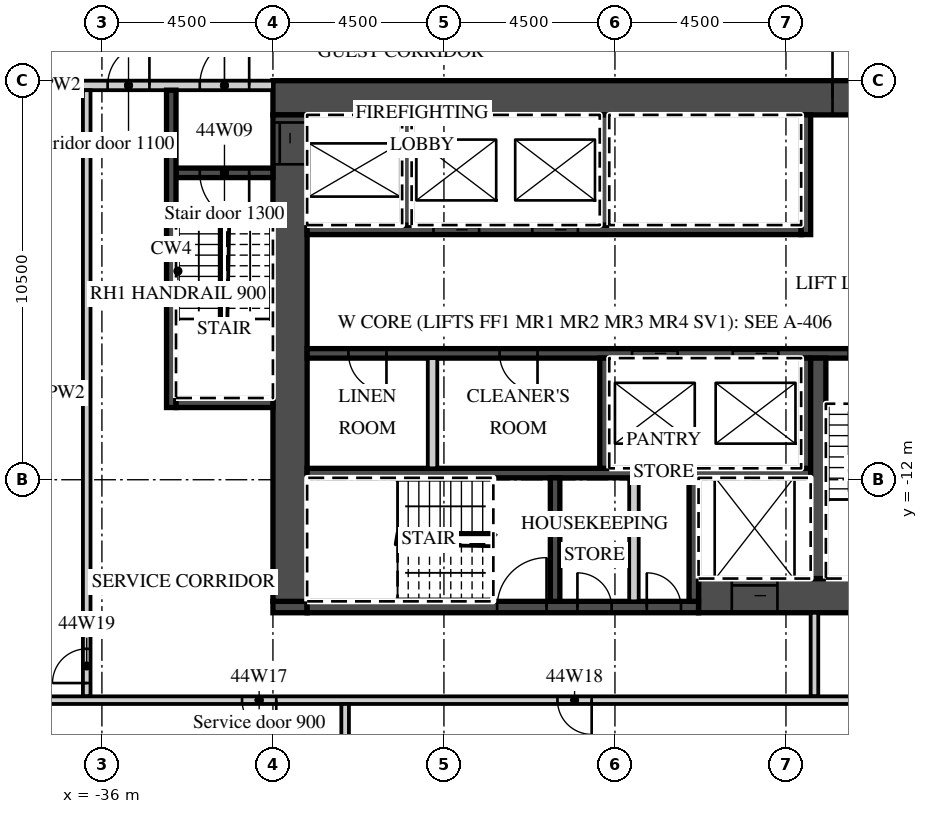
"""IFC4 building model, lengths in metres.
Left out: names, types, materials, properties, quantities, classifications, styles, units other than length and angle.
Written with IfcOpenShell. Run it as: python <this file> out.ifc"""

import sys

from ifc_helpers import new_model, si_unit, direction, frame, frame_2d, origin, place, context, subcontext, project, spatial, rectangle, extrude, element, fill, save


model = new_model("IFC4")
c1 = context("Model", 3, precision=1e-05, world=origin(), true_north=direction((0.0, 1.0)))
c2 = subcontext(c1, "Body", "Model", "MODEL_VIEW")
j1 = project(units=[si_unit("LENGTHUNIT", "METRE"), si_unit("PLANEANGLEUNIT", "RADIAN")], contexts=[c1])
p1 = place(None, origin())
s1 = spatial("IfcSite", under=j1, at=p1, CompositionType="ELEMENT")
p2 = place(p1, origin())
s2 = spatial("IfcBuilding", under=s1, at=p2, CompositionType="ELEMENT")
p3 = place(p2, frame((0.0, 0.0, 186.7)))
s3 = spatial("IfcBuildingStorey", under=s2, at=p3, CompositionType="ELEMENT", Elevation=186.7)
p4 = place(p3, frame((-31.5, -1.95, 0.0), z_axis=(0.0, 0.0, 1.0), x_axis=(1.0, 0.0, 0.0)))
e1 = element("IfcWall", 1, at=p4, inside=s3, PredefinedType="SHEAR", context=c2, shape_type="SweptSolid", body=[
    extrude(rectangle(XDim=18.0, YDim=0.9, at=frame_2d((9.0, 0.0))), origin(), (0.0, 0.0, 1.0), 3.02),
])
p5 = place(p4, frame((14.725, 0.0, 0.0)))
e2 = element("IfcOpeningElement", 2, at=p5, cuts=e1, PredefinedType="OPENING", context=c2, shape_type="SweptSolid", body=[
    extrude(rectangle(XDim=1.8, YDim=2.1, at=frame_2d((0.9, 1.05))), frame((0.0, 0.46, 0.0), z_axis=(0.0, -1.0, 0.0), x_axis=(1.0, 0.0, 0.0)), (0.0, 0.0, 1.0), 0.92),
])
p6 = place(p3, frame((-20.3, -15.05, 0.0), z_axis=(0.0, 0.0, 1.0), x_axis=(1.0, 0.0, 0.0)))
e3 = element("IfcWall", 3, at=p6, inside=s3, PredefinedType="SHEAR", context=c2, shape_type="SweptSolid", body=[
    extrude(rectangle(XDim=6.8, YDim=0.9, at=frame_2d((3.4, 0.0))), origin(), (0.0, 0.0, 1.0), 3.02),
])
p7 = place(p6, frame((0.875, 0.0, 0.0)))
e4 = element("IfcOpeningElement", 4, at=p7, cuts=e3, PredefinedType="OPENING", context=c2, shape_type="SweptSolid", body=[
    extrude(rectangle(XDim=1.2, YDim=2.1, at=frame_2d((0.6, 1.05))), frame((0.0, 0.46, 0.0), z_axis=(0.0, -1.0, 0.0), x_axis=(1.0, 0.0, 0.0)), (0.0, 0.0, 1.0), 0.92),
])
p8 = place(p3, frame((-31.5, -15.35, 0.0), z_axis=(0.0, 0.0, 1.0), x_axis=(1.0, 0.0, 0.0)))
e5 = element("IfcWall", 5, at=p8, inside=s3, PredefinedType="SHEAR", context=c2, shape_type="SweptSolid", body=[
    extrude(rectangle(XDim=0.9, YDim=0.3, at=frame_2d((0.45, 0.0))), origin(), (0.0, 0.0, 1.0), 3.02),
])
p9 = place(p3, frame((-30.6, -15.35, 0.0), z_axis=(0.0, 0.0, 1.0), x_axis=(1.0, 0.0, 0.0)))
e6 = element("IfcWall", 6, at=p9, inside=s3, PredefinedType="SHEAR", context=c2, shape_type="SweptSolid", body=[
    extrude(rectangle(XDim=10.3, YDim=0.3, at=frame_2d((5.15, 0.0))), origin(), (0.0, 0.0, 1.0), 3.02),
])
p10 = place(p9, frame((5.0, 0.0, 0.0)))
e7 = element("IfcOpeningElement", 7, at=p10, cuts=e6, PredefinedType="OPENING", context=c2, shape_type="SweptSolid", body=[
    extrude(rectangle(XDim=1.3, YDim=2.1, at=frame_2d((0.65, 1.05))), frame((0.0, 0.16, 0.0), z_axis=(0.0, -1.0, 0.0), x_axis=(1.0, 0.0, 0.0)), (0.0, 0.0, 1.0), 0.32),
])
p11 = place(p9, frame((7.113, 0.0, 0.0)))
e8 = element("IfcOpeningElement", 8, at=p11, cuts=e6, PredefinedType="OPENING", context=c2, shape_type="SweptSolid", body=[
    extrude(rectangle(XDim=0.9, YDim=2.1, at=frame_2d((0.45, 1.05))), frame((0.0, 0.16, 0.0), z_axis=(0.0, -1.0, 0.0), x_axis=(1.0, 0.0, 0.0)), (0.0, 0.0, 1.0), 0.32),
])
p12 = place(p9, frame((8.938, 0.0, 0.0)))
e9 = element("IfcOpeningElement", 9, at=p12, cuts=e6, PredefinedType="OPENING", context=c2, shape_type="SweptSolid", body=[
    extrude(rectangle(XDim=0.9, YDim=2.1, at=frame_2d((0.45, 1.05))), frame((0.0, 0.16, 0.0), z_axis=(0.0, -1.0, 0.0), x_axis=(1.0, 0.0, 0.0)), (0.0, 0.0, 1.0), 0.32),
])
p13 = place(p3, frame((-31.05, -15.2, 0.0), z_axis=(0.0, 0.0, 1.0), x_axis=(0.0, 1.0, 0.0)))
e10 = element("IfcWall", 10, at=p13, inside=s3, PredefinedType="SHEAR", context=c2, shape_type="SweptSolid", body=[
    extrude(rectangle(XDim=12.8, YDim=0.9, at=frame_2d((6.4, 0.0))), origin(), (0.0, 0.0, 1.0), 3.02),
])
p14 = place(p13, frame((11.5, 0.0, 0.0)))
e11 = element("IfcOpeningElement", 11, at=p14, cuts=e10, PredefinedType="OPENING", context=c2, shape_type="SweptSolid", body=[
    extrude(rectangle(XDim=1.1, YDim=2.1, at=frame_2d((0.55, 1.05))), frame((0.0, 0.46, 0.0), z_axis=(0.0, -1.0, 0.0), x_axis=(1.0, 0.0, 0.0)), (0.0, 0.0, 1.0), 0.92),
])
p15 = place(p3, frame((-30.6, -5.425, 0.0), z_axis=(0.0, 0.0, 1.0), x_axis=(1.0, 0.0, 0.0)))
e12 = element("IfcWall", 12, at=p15, inside=s3, PredefinedType="SHEAR", context=c2, shape_type="SweptSolid", body=[
    extrude(rectangle(XDim=13.0, YDim=0.25, at=frame_2d((6.5, 0.0))), origin(), (0.0, 0.0, 1.0), 3.02),
])
p16 = place(p15, frame((3.325, 0.0, 0.0)))
e13 = element("IfcOpeningElement", 13, at=p16, cuts=e12, PredefinedType="OPENING", context=c2, shape_type="SweptSolid", body=[
    extrude(rectangle(XDim=1.2, YDim=2.1, at=frame_2d((0.6, 1.05))), frame((0.0, 0.135, 0.0), z_axis=(0.0, -1.0, 0.0), x_axis=(1.0, 0.0, 0.0)), (0.0, 0.0, 1.0), 0.27),
])
p17 = place(p15, frame((5.925, 0.0, 0.0)))
e14 = element("IfcOpeningElement", 14, at=p17, cuts=e12, PredefinedType="OPENING", context=c2, shape_type="SweptSolid", body=[
    extrude(rectangle(XDim=1.2, YDim=2.1, at=frame_2d((0.6, 1.05))), frame((0.0, 0.135, 0.0), z_axis=(0.0, -1.0, 0.0), x_axis=(1.0, 0.0, 0.0)), (0.0, 0.0, 1.0), 0.27),
])
p18 = place(p3, frame((-17.475, -5.55, 0.0), z_axis=(0.0, 0.0, 1.0), x_axis=(0.0, 1.0, 0.0)))
e15 = element("IfcWall", 15, at=p18, inside=s3, PredefinedType="SHEAR", context=c2, shape_type="SweptSolid", body=[
    extrude(rectangle(XDim=3.15, YDim=0.25, at=frame_2d((1.575, 0.0))), origin(), (0.0, 0.0, 1.0), 3.02),
])
for number, where, z_axis, x_axis in (
    (16, (-27.975, -5.3, 0.0), (0.0, 0.0, 1.0), (0.0, 1.0, 0.0)),
    (17, (-22.775, -5.3, 0.0), (0.0, 0.0, 1.0), (0.0, 1.0, 0.0)),
):
    element("IfcWall", number, at=place(p3, frame(where, z_axis=z_axis, x_axis=x_axis)), inside=s3, PredefinedType="SHEAR", context=c2, shape_type="SweptSolid", body=[
        extrude(rectangle(XDim=2.9, YDim=0.25, at=frame_2d((1.45, 0.0))), origin(), (0.0, 0.0, 1.0), 3.02),
    ])
p19 = place(p3, frame((-30.6, -8.675, 0.0), z_axis=(0.0, 0.0, 1.0), x_axis=(1.0, 0.0, 0.0)))
e18 = element("IfcWall", 18, at=p19, inside=s3, PredefinedType="SHEAR", context=c2, shape_type="SweptSolid", body=[
    extrude(rectangle(XDim=16.2, YDim=0.25, at=frame_2d((8.1, 0.0))), origin(), (0.0, 0.0, 1.0), 3.02),
])
p20 = place(p19, frame((8.55, 0.0, 0.0)))
e19 = element("IfcOpeningElement", 19, at=p20, cuts=e18, PredefinedType="OPENING", context=c2, shape_type="SweptSolid", body=[
    extrude(rectangle(XDim=1.2, YDim=2.1, at=frame_2d((0.6, 1.05))), frame((0.0, 0.135, 0.0), z_axis=(0.0, -1.0, 0.0), x_axis=(1.0, 0.0, 0.0)), (0.0, 0.0, 1.0), 0.27),
])
p21 = place(p19, frame((11.2, 0.0, 0.0)))
e20 = element("IfcOpeningElement", 20, at=p21, cuts=e18, PredefinedType="OPENING", context=c2, shape_type="SweptSolid", body=[
    extrude(rectangle(XDim=1.2, YDim=2.1, at=frame_2d((0.6, 1.05))), frame((0.0, 0.135, 0.0), z_axis=(0.0, -1.0, 0.0), x_axis=(1.0, 0.0, 0.0)), (0.0, 0.0, 1.0), 0.27),
])
p22 = place(p19, frame((14.25, 0.0, 0.0)))
e21 = element("IfcOpeningElement", 21, at=p22, cuts=e18, PredefinedType="OPENING", context=c2, shape_type="SweptSolid", body=[
    extrude(rectangle(XDim=1.3, YDim=2.1, at=frame_2d((0.65, 1.05))), frame((0.0, 0.135, 0.0), z_axis=(0.0, -1.0, 0.0), x_axis=(1.0, 0.0, 0.0)), (0.0, 0.0, 1.0), 0.27),
])
p23 = place(p19, frame((1.087, 0.0, 0.0)))
e22 = element("IfcOpeningElement", 22, at=p23, cuts=e18, PredefinedType="OPENING", context=c2, shape_type="SweptSolid", body=[
    extrude(rectangle(XDim=1.0, YDim=2.1, at=frame_2d((0.5, 1.05))), frame((0.0, 0.135, 0.0), z_axis=(0.0, -1.0, 0.0), x_axis=(1.0, 0.0, 0.0)), (0.0, 0.0, 1.0), 0.27),
])
p24 = place(p19, frame((5.062, 0.0, 0.0)))
e23 = element("IfcOpeningElement", 23, at=p24, cuts=e18, PredefinedType="OPENING", context=c2, shape_type="SweptSolid", body=[
    extrude(rectangle(XDim=1.0, YDim=2.1, at=frame_2d((0.5, 1.05))), frame((0.0, 0.135, 0.0), z_axis=(0.0, -1.0, 0.0), x_axis=(1.0, 0.0, 0.0)), (0.0, 0.0, 1.0), 0.27),
])
p25 = place(p3, frame((-30.6, -11.825, 0.0), z_axis=(0.0, 0.0, 1.0), x_axis=(1.0, 0.0, 0.0)))
e24 = element("IfcWall", 24, at=p25, inside=s3, PredefinedType="SHEAR", context=c2, shape_type="SweptSolid", body=[
    extrude(rectangle(XDim=13.25, YDim=0.25, at=frame_2d((6.625, 0.0))), origin(), (0.0, 0.0, 1.0), 3.02),
])
for number, where, z_axis, x_axis in (
    (25, (-17.475, -11.7, 0.0), (0.0, 0.0, 1.0), (0.0, 1.0, 0.0)),
    (26, (-22.775, -11.7, 0.0), (0.0, 0.0, 1.0), (0.0, 1.0, 0.0)),
):
    element("IfcWall", number, at=place(p3, frame(where, z_axis=z_axis, x_axis=x_axis)), inside=s3, PredefinedType="SHEAR", context=c2, shape_type="SweptSolid", body=[
        extrude(rectangle(XDim=2.9, YDim=0.25, at=frame_2d((1.45, 0.0))), origin(), (0.0, 0.0, 1.0), 3.02),
    ])
p26 = place(p3, frame((-27.3, -11.7, 0.0), z_axis=(0.0, 0.0, 1.0), x_axis=(0.0, 1.0, 0.0)))
e27 = element("IfcWall", 27, at=p26, inside=s3, PredefinedType="PARTITIONING", context=c2, shape_type="SweptSolid", body=[
    extrude(rectangle(XDim=2.9, YDim=0.25, at=frame_2d((1.45, 0.0))), origin(), (0.0, 0.0, 1.0), 3.02),
])
p27 = place(p3, frame((-17.15, -14.6, 0.0), z_axis=(0.0, 0.0, 1.0), x_axis=(0.0, 1.0, 0.0)))
e28 = element("IfcWall", 28, at=p27, inside=s3, PredefinedType="SHEAR", context=c2, shape_type="SweptSolid", body=[
    extrude(rectangle(XDim=5.8, YDim=0.4, at=frame_2d((2.9, 0.0))), origin(), (0.0, 0.0, 1.0), 3.02),
])
for number, where, z_axis, x_axis in (
    (29, (-20.425, -15.2, 0.0), (0.0, 0.0, 1.0), (0.0, 1.0, 0.0)),
    (30, (-24.075, -15.2, 0.0), (0.0, 0.0, 1.0), (0.0, 1.0, 0.0)),
):
    element("IfcWall", number, at=place(p3, frame(where, z_axis=z_axis, x_axis=x_axis)), inside=s3, PredefinedType="SHEAR", context=c2, shape_type="SweptSolid", body=[
        extrude(rectangle(XDim=3.25, YDim=0.25, at=frame_2d((1.625, 0.0))), origin(), (0.0, 0.0, 1.0), 3.02),
    ])
p28 = place(p3, frame((-22.0, -15.2, 0.0), z_axis=(0.0, 0.0, 1.0), x_axis=(0.0, 1.0, 0.0)))
e31 = element("IfcWall", 31, at=p28, inside=s3, PredefinedType="PARTITIONING", context=c2, shape_type="SweptSolid", body=[
    extrude(rectangle(XDim=3.25, YDim=0.25, at=frame_2d((1.625, 0.0))), origin(), (0.0, 0.0, 1.0), 3.02),
])
p29 = place(p3, frame((-42.632, -1.625, 0.0), z_axis=(0.0, 0.0, 1.0), x_axis=(1.0, 0.0, 0.0)))
e32 = element("IfcWall", 32, at=p29, inside=s3, PredefinedType="PARTITIONING", context=c2, shape_type="SweptSolid", body=[
    extrude(rectangle(XDim=11.132, YDim=0.25, at=frame_2d((5.566, 0.0))), origin(), (0.0, 0.0, 1.0), 3.02),
])
p30 = place(p29, frame((9.207, 0.0, 0.0)))
e33 = element("IfcOpeningElement", 33, at=p30, cuts=e32, PredefinedType="OPENING", context=c2, shape_type="SweptSolid", body=[
    extrude(rectangle(XDim=1.3, YDim=2.1, at=frame_2d((0.65, 1.05))), frame((0.0, 0.135, 0.0), z_axis=(0.0, -1.0, 0.0), x_axis=(1.0, 0.0, 0.0)), (0.0, 0.0, 1.0), 0.27),
])
p31 = place(p29, frame((6.781, 0.0, 0.0)))
e34 = element("IfcOpeningElement", 34, at=p31, cuts=e32, PredefinedType="OPENING", context=c2, shape_type="SweptSolid", body=[
    extrude(rectangle(XDim=1.1, YDim=2.1, at=frame_2d((0.55, 1.05))), frame((0.0, 0.135, 0.0), z_axis=(0.0, -1.0, 0.0), x_axis=(1.0, 0.0, 0.0)), (0.0, 0.0, 1.0), 0.27),
])
p32 = place(p3, frame((-34.05, -3.925, 0.0), z_axis=(0.0, 0.0, 1.0), x_axis=(1.0, 0.0, 0.0)))
e35 = element("IfcWall", 35, at=p32, inside=s3, PredefinedType="SHEAR", context=c2, shape_type="SweptSolid", body=[
    extrude(rectangle(XDim=2.55, YDim=0.25, at=frame_2d((1.275, 0.0))), origin(), (0.0, 0.0, 1.0), 3.02),
])
p33 = place(p32, frame((0.625, 0.0, 0.0)))
e36 = element("IfcOpeningElement", 36, at=p33, cuts=e35, PredefinedType="OPENING", context=c2, shape_type="SweptSolid", body=[
    extrude(rectangle(XDim=1.3, YDim=2.1, at=frame_2d((0.65, 1.05))), frame((0.0, 0.135, 0.0), z_axis=(0.0, -1.0, 0.0), x_axis=(1.0, 0.0, 0.0)), (0.0, 0.0, 1.0), 0.27),
])
p34 = place(p3, frame((-34.175, -10.1, 0.0), z_axis=(0.0, 0.0, 1.0), x_axis=(0.0, 1.0, 0.0)))
e37 = element("IfcWall", 37, at=p34, inside=s3, PredefinedType="SHEAR", context=c2, shape_type="SweptSolid", body=[
    extrude(rectangle(XDim=8.35, YDim=0.25, at=frame_2d((4.175, 0.0))), origin(), (0.0, 0.0, 1.0), 3.02),
])
p35 = place(p3, frame((-34.05, -9.975, 0.0), z_axis=(0.0, 0.0, 1.0), x_axis=(1.0, 0.0, 0.0)))
e38 = element("IfcWall", 38, at=p35, inside=s3, PredefinedType="SHEAR", context=c2, shape_type="SweptSolid", body=[
    extrude(rectangle(XDim=2.55, YDim=0.25, at=frame_2d((1.275, 0.0))), origin(), (0.0, 0.0, 1.0), 3.02),
])
p36 = place(p3, frame((-17.25, -17.7, 0.0), z_axis=(0.0, 0.0, 1.0), x_axis=(0.0, 1.0, 0.0)))
e39 = element("IfcWall", 39, at=p36, inside=s3, PredefinedType="PARTITIONING", context=c2, shape_type="SweptSolid", body=[
    extrude(rectangle(XDim=2.2, YDim=0.2, at=frame_2d((1.1, 0.0))), origin(), (0.0, 0.0, 1.0), 3.02),
])
p37 = place(p3, frame((-36.4, -17.7, 0.0), z_axis=(0.0, 0.0, 1.0), x_axis=(0.0, 1.0, 0.0)))
e40 = element("IfcWall", 40, at=p37, inside=s3, PredefinedType="PARTITIONING", context=c2, shape_type="SweptSolid", body=[
    extrude(rectangle(XDim=15.95, YDim=0.2, at=frame_2d((7.975, 0.0))), origin(), (0.0, 0.0, 1.0), 3.02),
])
p38 = place(p37, frame((0.35, 0.0, 0.0)))
e41 = element("IfcOpeningElement", 41, at=p38, cuts=e40, PredefinedType="OPENING", context=c2, shape_type="SweptSolid", body=[
    extrude(rectangle(XDim=0.9, YDim=2.1, at=frame_2d((0.45, 1.05))), frame((0.0, 0.11, 0.0), z_axis=(0.0, -1.0, 0.0), x_axis=(1.0, 0.0, 0.0)), (0.0, 0.0, 1.0), 0.22),
])
p39 = place(p3, frame((-41.074, -17.8, 0.0), z_axis=(0.0, 0.0, 1.0), x_axis=(1.0, 0.0, 0.0)))
e42 = element("IfcWall", 42, at=p39, inside=s3, PredefinedType="PARTITIONING", context=c2, shape_type="SweptSolid", body=[
    extrude(rectangle(XDim=27.474, YDim=0.2, at=frame_2d((13.737, 0.0))), origin(), (0.0, 0.0, 1.0), 3.02),
])
p40 = place(p39, frame((8.762, 0.0, 0.0)))
e43 = element("IfcOpeningElement", 43, at=p40, cuts=e42, PredefinedType="OPENING", context=c2, shape_type="SweptSolid", body=[
    extrude(rectangle(XDim=0.9, YDim=2.1, at=frame_2d((0.45, 1.05))), frame((0.0, 0.11, 0.0), z_axis=(0.0, -1.0, 0.0), x_axis=(1.0, 0.0, 0.0)), (0.0, 0.0, 1.0), 0.22),
])
p41 = place(p39, frame((17.062, 0.0, 0.0)))
e44 = element("IfcOpeningElement", 44, at=p41, cuts=e42, PredefinedType="OPENING", context=c2, shape_type="SweptSolid", body=[
    extrude(rectangle(XDim=0.9, YDim=2.1, at=frame_2d((0.45, 1.05))), frame((0.0, 0.11, 0.0), z_axis=(0.0, -1.0, 0.0), x_axis=(1.0, 0.0, 0.0)), (0.0, 0.0, 1.0), 0.22),
])
p42 = place(p3, frame((-29.6, -23.852, 0.0), z_axis=(0.0, 0.0, 1.0), x_axis=(0.0, 1.0, 0.0)))
e45 = element("IfcWall", 45, at=p42, inside=s3, PredefinedType="PARTITIONING", context=c2, shape_type="SweptSolid", body=[
    extrude(rectangle(XDim=5.952, YDim=0.2, at=frame_2d((2.976, 0.0))), origin(), (0.0, 0.0, 1.0), 3.02),
])
p43 = place(p20, origin())
e46 = element("IfcDoor", 46, at=p43, inside=s3, OperationType="SLIDING_TO_LEFT", PredefinedType="DOOR", context=c2, shape_type="SweptSolid", body=[
    extrude(rectangle(XDim=1.2, YDim=2.1, at=frame_2d((0.6, 1.05))), frame((0.0, 0.025, 0.0), z_axis=(0.0, -1.0, 0.0), x_axis=(1.0, 0.0, 0.0)), (0.0, 0.0, 1.0), 0.05),
])
fill(e19, e46)
p44 = place(p21, origin())
e47 = element("IfcDoor", 47, at=p44, inside=s3, OperationType="SLIDING_TO_RIGHT", PredefinedType="DOOR", context=c2, shape_type="SweptSolid", body=[
    extrude(rectangle(XDim=1.2, YDim=2.1, at=frame_2d((0.6, 1.05))), frame((0.0, 0.025, 0.0), z_axis=(0.0, -1.0, 0.0), x_axis=(1.0, 0.0, 0.0)), (0.0, 0.0, 1.0), 0.05),
])
fill(e20, e47)
p45 = place(p16, origin())
e48 = element("IfcDoor", 48, at=p45, inside=s3, OperationType="SLIDING_TO_RIGHT", PredefinedType="DOOR", context=c2, shape_type="SweptSolid", body=[
    extrude(rectangle(XDim=1.2, YDim=2.1, at=frame_2d((0.6, 1.05))), frame((0.0, 0.025, 0.0), z_axis=(0.0, -1.0, 0.0), x_axis=(1.0, 0.0, 0.0)), (0.0, 0.0, 1.0), 0.05),
])
fill(e13, e48)
p46 = place(p17, origin())
e49 = element("IfcDoor", 49, at=p46, inside=s3, OperationType="SLIDING_TO_RIGHT", PredefinedType="DOOR", context=c2, shape_type="SweptSolid", body=[
    extrude(rectangle(XDim=1.2, YDim=2.1, at=frame_2d((0.6, 1.05))), frame((0.0, 0.025, 0.0), z_axis=(0.0, -1.0, 0.0), x_axis=(1.0, 0.0, 0.0)), (0.0, 0.0, 1.0), 0.05),
])
fill(e14, e49)
p47 = place(p7, origin())
e50 = element("IfcDoor", 50, at=p47, inside=s3, OperationType="SLIDING_TO_LEFT", PredefinedType="DOOR", context=c2, shape_type="SweptSolid", body=[
    extrude(rectangle(XDim=1.2, YDim=2.1, at=frame_2d((0.6, 1.05))), frame((0.0, 0.025, 0.0), z_axis=(0.0, -1.0, 0.0), x_axis=(1.0, 0.0, 0.0)), (0.0, 0.0, 1.0), 0.05),
])
fill(e4, e50)
p48 = place(p14, origin())
e51 = element("IfcDoor", 51, at=p48, inside=s3, OperationType="SLIDING_TO_RIGHT", PredefinedType="DOOR", context=c2, shape_type="SweptSolid", body=[
    extrude(rectangle(XDim=1.1, YDim=2.1, at=frame_2d((0.55, 1.05))), frame((0.0, 0.025, 0.0), z_axis=(0.0, -1.0, 0.0), x_axis=(1.0, 0.0, 0.0)), (0.0, 0.0, 1.0), 0.05),
])
fill(e11, e51)
p49 = place(p5, origin())
e52 = element("IfcDoor", 52, at=p49, inside=s3, OperationType="DOUBLE_DOOR_DOUBLE_SWING", PredefinedType="DOOR", context=c2, shape_type="SweptSolid", body=[
    extrude(rectangle(XDim=1.8, YDim=2.1, at=frame_2d((0.9, 1.05))), frame((0.0, 0.025, 0.0), z_axis=(0.0, -1.0, 0.0), x_axis=(1.0, 0.0, 0.0)), (0.0, 0.0, 1.0), 0.05),
])
fill(e2, e52)
p50 = place(p30, origin())
e53 = element("IfcDoor", 53, at=p50, inside=s3, OperationType="SINGLE_SWING_RIGHT", PredefinedType="DOOR", context=c2, shape_type="SweptSolid", body=[
    extrude(rectangle(XDim=1.3, YDim=2.1, at=frame_2d((0.65, 1.05))), frame((0.0, 0.025, 0.0), z_axis=(0.0, -1.0, 0.0), x_axis=(1.0, 0.0, 0.0)), (0.0, 0.0, 1.0), 0.05),
])
fill(e33, e53)
p51 = place(p33, origin())
e54 = element("IfcDoor", 54, at=p51, inside=s3, OperationType="SINGLE_SWING_RIGHT", PredefinedType="DOOR", context=c2, shape_type="SweptSolid", body=[
    extrude(rectangle(XDim=1.3, YDim=2.1, at=frame_2d((0.65, 1.05))), frame((0.0, 0.025, 0.0), z_axis=(0.0, -1.0, 0.0), x_axis=(1.0, 0.0, 0.0)), (0.0, 0.0, 1.0), 0.05),
])
fill(e36, e54)
p52 = place(p31, origin())
e55 = element("IfcDoor", 55, at=p52, inside=s3, OperationType="SINGLE_SWING_RIGHT", PredefinedType="DOOR", context=c2, shape_type="SweptSolid", body=[
    extrude(rectangle(XDim=1.1, YDim=2.1, at=frame_2d((0.55, 1.05))), frame((0.0, 0.025, 0.0), z_axis=(0.0, -1.0, 0.0), x_axis=(1.0, 0.0, 0.0)), (0.0, 0.0, 1.0), 0.05),
])
fill(e34, e55)
p53 = place(p22, origin())
e56 = element("IfcDoor", 56, at=p53, inside=s3, OperationType="SINGLE_SWING_RIGHT", PredefinedType="DOOR", context=c2, shape_type="SweptSolid", body=[
    extrude(rectangle(XDim=1.3, YDim=2.1, at=frame_2d((0.65, 1.05))), frame((0.0, 0.025, 0.0), z_axis=(0.0, -1.0, 0.0), x_axis=(1.0, 0.0, 0.0)), (0.0, 0.0, 1.0), 0.05),
])
fill(e21, e56)
p54 = place(p10, origin())
e57 = element("IfcDoor", 57, at=p54, inside=s3, OperationType="SINGLE_SWING_RIGHT", PredefinedType="DOOR", context=c2, shape_type="SweptSolid", body=[
    extrude(rectangle(XDim=1.3, YDim=2.1, at=frame_2d((0.65, 1.05))), frame((0.0, 0.025, 0.0), z_axis=(0.0, -1.0, 0.0), x_axis=(1.0, 0.0, 0.0)), (0.0, 0.0, 1.0), 0.05),
])
fill(e7, e57)
p55 = place(p11, origin())
e58 = element("IfcDoor", 58, at=p55, inside=s3, OperationType="SINGLE_SWING_LEFT", PredefinedType="DOOR", context=c2, shape_type="SweptSolid", body=[
    extrude(rectangle(XDim=0.9, YDim=2.1, at=frame_2d((0.45, 1.05))), frame((0.0, 0.025, 0.0), z_axis=(0.0, -1.0, 0.0), x_axis=(1.0, 0.0, 0.0)), (0.0, 0.0, 1.0), 0.05),
])
fill(e8, e58)
p56 = place(p12, origin())
e59 = element("IfcDoor", 59, at=p56, inside=s3, OperationType="SINGLE_SWING_LEFT", PredefinedType="DOOR", context=c2, shape_type="SweptSolid", body=[
    extrude(rectangle(XDim=0.9, YDim=2.1, at=frame_2d((0.45, 1.05))), frame((0.0, 0.025, 0.0), z_axis=(0.0, -1.0, 0.0), x_axis=(1.0, 0.0, 0.0)), (0.0, 0.0, 1.0), 0.05),
])
fill(e9, e59)
p57 = place(p23, origin())
e60 = element("IfcDoor", 60, at=p57, inside=s3, OperationType="SINGLE_SWING_RIGHT", PredefinedType="DOOR", context=c2, shape_type="SweptSolid", body=[
    extrude(rectangle(XDim=1.0, YDim=2.1, at=frame_2d((0.5, 1.05))), frame((0.0, 0.025, 0.0), z_axis=(0.0, -1.0, 0.0), x_axis=(1.0, 0.0, 0.0)), (0.0, 0.0, 1.0), 0.05),
])
fill(e22, e60)
p58 = place(p24, origin())
e61 = element("IfcDoor", 61, at=p58, inside=s3, OperationType="SINGLE_SWING_RIGHT", PredefinedType="DOOR", context=c2, shape_type="SweptSolid", body=[
    extrude(rectangle(XDim=1.0, YDim=2.1, at=frame_2d((0.5, 1.05))), frame((0.0, 0.025, 0.0), z_axis=(0.0, -1.0, 0.0), x_axis=(1.0, 0.0, 0.0)), (0.0, 0.0, 1.0), 0.05),
])
fill(e23, e61)
p59 = place(p40, origin())
e62 = element("IfcDoor", 62, at=p59, inside=s3, OperationType="SINGLE_SWING_RIGHT", PredefinedType="DOOR", context=c2, shape_type="SweptSolid", body=[
    extrude(rectangle(XDim=0.9, YDim=2.1, at=frame_2d((0.45, 1.05))), frame((0.0, 0.025, 0.0), z_axis=(0.0, -1.0, 0.0), x_axis=(1.0, 0.0, 0.0)), (0.0, 0.0, 1.0), 0.05),
])
fill(e43, e62)
p60 = place(p41, origin())
e63 = element("IfcDoor", 63, at=p60, inside=s3, OperationType="SINGLE_SWING_RIGHT", PredefinedType="DOOR", context=c2, shape_type="SweptSolid", body=[
    extrude(rectangle(XDim=0.9, YDim=2.1, at=frame_2d((0.45, 1.05))), frame((0.0, 0.025, 0.0), z_axis=(0.0, -1.0, 0.0), x_axis=(1.0, 0.0, 0.0)), (0.0, 0.0, 1.0), 0.05),
])
fill(e44, e63)
p61 = place(p38, origin())
e64 = element("IfcDoor", 64, at=p61, inside=s3, OperationType="SINGLE_SWING_LEFT", PredefinedType="DOOR", context=c2, shape_type="SweptSolid", body=[
    extrude(rectangle(XDim=0.9, YDim=2.1, at=frame_2d((0.45, 1.05))), frame((0.0, 0.025, 0.0), z_axis=(0.0, -1.0, 0.0), x_axis=(1.0, 0.0, 0.0)), (0.0, 0.0, 1.0), 0.05),
])
fill(e41, e64)
save(model, sys.argv[1])
